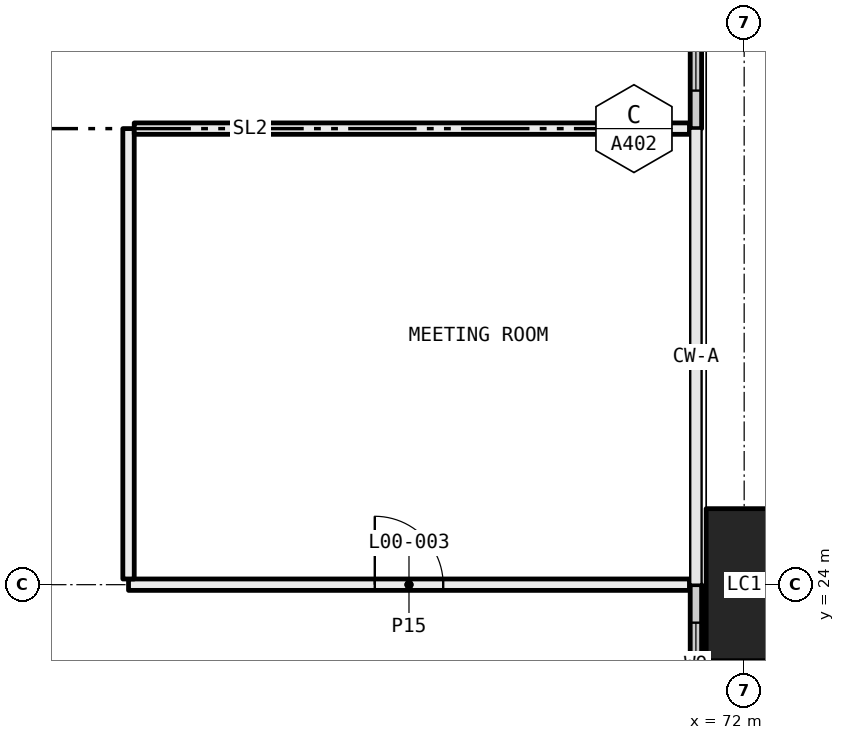
"""IFC4 building model, lengths in metres.
Left out: names, types, materials, properties, quantities, classifications, styles, units other than length and angle.
Written with IfcOpenShell. Run it as: python <this file> out.ifc"""

import sys

from ifc_helpers import new_model, si_unit, direction, frame, frame_2d, origin, origin_2d, place, context, subcontext, project, spatial, rectangle, hollow_rectangle, extrude, element, fill, save


model = new_model("IFC4")
c1 = context("Model", 3, precision=1e-05, world=origin(), true_north=direction((0.0, 1.0)))
c2 = subcontext(c1, "Body", "Model", "MODEL_VIEW")
j1 = project(units=[si_unit("LENGTHUNIT", "METRE"), si_unit("PLANEANGLEUNIT", "RADIAN")], contexts=[c1])
p1 = place(None, origin())
s1 = spatial("IfcSite", under=j1, at=p1, CompositionType="ELEMENT")
p2 = place(p1, origin())
s2 = spatial("IfcBuilding", under=s1, at=p2, CompositionType="ELEMENT")
p3 = place(p2, origin())
s3 = spatial("IfcBuildingStorey", under=s2, at=p3, CompositionType="ELEMENT", Elevation=0.0)
p4 = place(p3, frame((72.0, 24.0, -0.9), z_axis=(0.0, 0.0, 1.0), x_axis=(0.0, 1.0, 0.0)))
e1 = element("IfcColumn", 1, at=p4, inside=s3, PredefinedType="COLUMN", context=c2, shape_type="SweptSolid", body=[
    extrude(hollow_rectangle(XDim=2.0, YDim=1.0, WallThickness=0.08, at=origin_2d()), origin(), (0.0, 0.0, 1.0), 6.5),
])
p5 = place(p3, frame((71.365, 30.0, 0.0), z_axis=(0.0, 0.0, 1.0), x_axis=(0.0, 1.0, 0.0)))
e2 = element("IfcWall", 2, at=p5, inside=s3, PredefinedType="ELEMENTEDWALL", context=c2, shape_type="SweptSolid", body=[
    extrude(rectangle(XDim=6.0, YDim=0.15, at=frame_2d((3.0, 0.0))), origin(), (0.0, 0.0, 1.0), 5.6),
])
p6 = place(p5, frame((0.5, 0.0, 0.45)))
e3 = element("IfcOpeningElement", 3, at=p6, cuts=e2, PredefinedType="OPENING", context=c2, shape_type="SweptSolid", body=[
    extrude(rectangle(XDim=1.4, YDim=5.1, at=frame_2d((0.7, 2.55))), frame((0.0, 0.085, 0.0), z_axis=(0.0, -1.0, 0.0), x_axis=(1.0, 0.0, 0.0)), (0.0, 0.0, 1.0), 0.17),
])
p7 = place(p5, frame((4.1, 0.0, 0.45)))
e4 = element("IfcOpeningElement", 4, at=p7, cuts=e2, PredefinedType="OPENING", context=c2, shape_type="SweptSolid", body=[
    extrude(rectangle(XDim=1.4, YDim=5.1, at=frame_2d((0.7, 2.55))), frame((0.0, 0.085, 0.0), z_axis=(0.0, -1.0, 0.0), x_axis=(1.0, 0.0, 0.0)), (0.0, 0.0, 1.0), 0.17),
])
p8 = place(p5, frame((2.1, 0.0, 0.0)))
e5 = element("IfcOpeningElement", 5, at=p8, cuts=e2, PredefinedType="OPENING", context=c2, shape_type="SweptSolid", body=[
    extrude(rectangle(XDim=1.8, YDim=2.4, at=frame_2d((0.9, 1.2))), frame((0.0, 0.085, 0.0), z_axis=(0.0, -1.0, 0.0), x_axis=(1.0, 0.0, 0.0)), (0.0, 0.0, 1.0), 0.17),
])
p9 = place(p5, frame((2.1, 0.0, 2.6)))
e6 = element("IfcOpeningElement", 6, at=p9, cuts=e2, PredefinedType="OPENING", context=c2, shape_type="SweptSolid", body=[
    extrude(rectangle(XDim=1.8, YDim=2.95, at=frame_2d((0.9, 1.475))), frame((0.0, 0.085, 0.0), z_axis=(0.0, -1.0, 0.0), x_axis=(1.0, 0.0, 0.0)), (0.0, 0.0, 1.0), 0.17),
])
p10 = place(p3, frame((71.365, 18.0, 0.0), z_axis=(0.0, 0.0, 1.0), x_axis=(0.0, 1.0, 0.0)))
e7 = element("IfcWall", 7, at=p10, inside=s3, PredefinedType="ELEMENTEDWALL", context=c2, shape_type="SweptSolid", body=[
    extrude(rectangle(XDim=6.0, YDim=0.15, at=frame_2d((3.0, 0.0))), origin(), (0.0, 0.0, 1.0), 5.6),
])
p11 = place(p10, frame((0.5, 0.0, 0.45)))
e8 = element("IfcOpeningElement", 8, at=p11, cuts=e7, PredefinedType="OPENING", context=c2, shape_type="SweptSolid", body=[
    extrude(rectangle(XDim=1.1, YDim=5.1, at=frame_2d((0.55, 2.55))), frame((0.0, 0.085, 0.0), z_axis=(0.0, -1.0, 0.0), x_axis=(1.0, 0.0, 0.0)), (0.0, 0.0, 1.0), 0.17),
])
p12 = place(p10, frame((4.4, 0.0, 0.45)))
e9 = element("IfcOpeningElement", 9, at=p12, cuts=e7, PredefinedType="OPENING", context=c2, shape_type="SweptSolid", body=[
    extrude(rectangle(XDim=1.1, YDim=5.1, at=frame_2d((0.55, 2.55))), frame((0.0, 0.085, 0.0), z_axis=(0.0, -1.0, 0.0), x_axis=(1.0, 0.0, 0.0)), (0.0, 0.0, 1.0), 0.17),
])
p13 = place(p10, frame((1.8, 0.0, 0.0)))
e10 = element("IfcOpeningElement", 10, at=p13, cuts=e7, PredefinedType="OPENING", context=c2, shape_type="SweptSolid", body=[
    extrude(rectangle(XDim=2.4, YDim=2.7, at=frame_2d((1.2, 1.35))), frame((0.0, 0.085, 0.0), z_axis=(0.0, -1.0, 0.0), x_axis=(1.0, 0.0, 0.0)), (0.0, 0.0, 1.0), 0.17),
])
p14 = place(p10, frame((1.8, 0.0, 2.9)))
e11 = element("IfcOpeningElement", 11, at=p14, cuts=e7, PredefinedType="OPENING", context=c2, shape_type="SweptSolid", body=[
    extrude(rectangle(XDim=2.4, YDim=2.65, at=frame_2d((1.2, 1.325))), frame((0.0, 0.085, 0.0), z_axis=(0.0, -1.0, 0.0), x_axis=(1.0, 0.0, 0.0)), (0.0, 0.0, 1.0), 0.17),
])
p15 = place(p3, frame((71.28, 24.0, 0.0), z_axis=(0.0, 0.0, 1.0), x_axis=(-1.0, 0.0, 0.0)))
e12 = element("IfcWall", 12, at=p15, inside=s3, PredefinedType="PARTITIONING", context=c2, shape_type="SweptSolid", body=[
    extrude(rectangle(XDim=7.38, YDim=0.15, at=frame_2d((3.69, 0.0))), origin(), (0.0, 0.0, 1.0), 5.0),
])
p16 = place(p15, frame((3.24, 0.0, 0.0)))
e13 = element("IfcOpeningElement", 13, at=p16, cuts=e12, PredefinedType="OPENING", context=c2, shape_type="SweptSolid", body=[
    extrude(rectangle(XDim=0.9, YDim=2.1, at=frame_2d((0.45, 1.05))), frame((0.0, 0.085, 0.0), z_axis=(0.0, -1.0, 0.0), x_axis=(1.0, 0.0, 0.0)), (0.0, 0.0, 1.0), 0.17),
])
p17 = place(p3, frame((63.9, 24.075, 0.0), z_axis=(0.0, 0.0, 1.0), x_axis=(0.0, 1.0, 0.0)))
e14 = element("IfcWall", 14, at=p17, inside=s3, PredefinedType="PARTITIONING", context=c2, shape_type="SweptSolid", body=[
    extrude(rectangle(XDim=5.925, YDim=0.15, at=frame_2d((2.962, 0.0))), origin(), (0.0, 0.0, 1.0), 5.0),
])
p18 = place(p3, frame((63.975, 30.0, 0.0), z_axis=(0.0, 0.0, 1.0), x_axis=(1.0, 0.0, 0.0)))
e15 = element("IfcWall", 15, at=p18, inside=s3, PredefinedType="PARTITIONING", context=c2, shape_type="SweptSolid", body=[
    extrude(rectangle(XDim=7.305, YDim=0.15, at=frame_2d((3.652, 0.0))), origin(), (0.0, 0.0, 1.0), 5.6),
])
p19 = place(p6, origin())
e16 = element("IfcWindow", 16, at=p19, inside=s3, PartitioningType="SINGLE_PANEL", PredefinedType="WINDOW", context=c2, shape_type="SweptSolid", body=[
    extrude(rectangle(XDim=1.4, YDim=5.1, at=frame_2d((0.7, 2.55))), frame((0.0, 0.03, 0.0), z_axis=(0.0, -1.0, 0.0), x_axis=(1.0, 0.0, 0.0)), (0.0, 0.0, 1.0), 0.06),
])
fill(e3, e16)
p20 = place(p12, origin())
e17 = element("IfcWindow", 17, at=p20, inside=s3, PartitioningType="SINGLE_PANEL", PredefinedType="WINDOW", context=c2, shape_type="SweptSolid", body=[
    extrude(rectangle(XDim=1.1, YDim=5.1, at=frame_2d((0.55, 2.55))), frame((0.0, 0.03, 0.0), z_axis=(0.0, -1.0, 0.0), x_axis=(1.0, 0.0, 0.0)), (0.0, 0.0, 1.0), 0.06),
])
fill(e9, e17)
p21 = place(p16, frame((0.9, 0.0, 0.0), x_axis=(-1.0, 0.0, 0.0)))
e18 = element("IfcDoor", 18, at=p21, inside=s3, OperationType="SINGLE_SWING_RIGHT", PredefinedType="DOOR", context=c2, shape_type="SweptSolid", body=[
    extrude(rectangle(XDim=0.9, YDim=2.1, at=frame_2d((0.45, 1.05))), frame((0.0, 0.025, 0.0), z_axis=(0.0, -1.0, 0.0), x_axis=(1.0, 0.0, 0.0)), (0.0, 0.0, 1.0), 0.05),
])
fill(e13, e18)
save(model, sys.argv[1])
